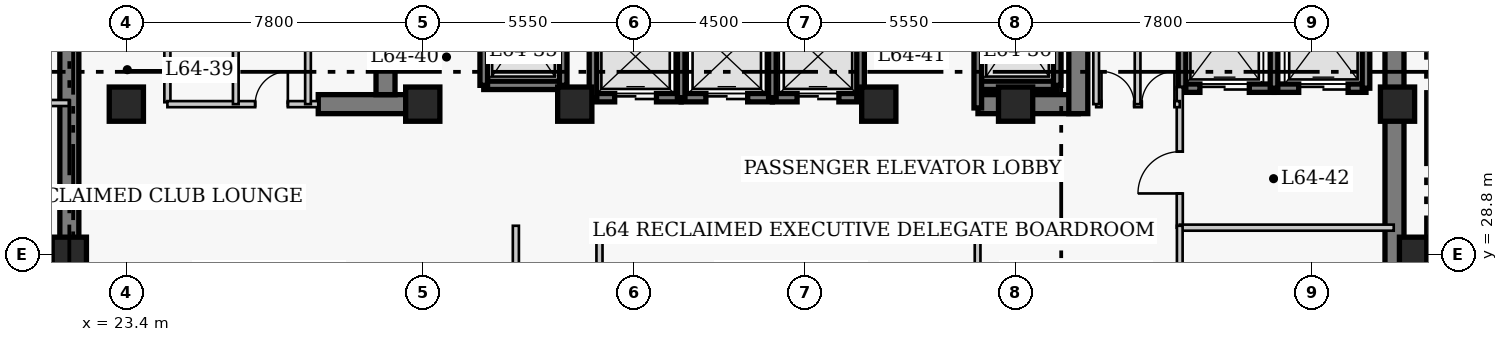
"""IFC4 building model, lengths in metres.
Left out: names, types, materials, properties, quantities, classifications, styles, units other than length and angle.
Written with IfcOpenShell. Run it as: python <this file> out.ifc"""

import sys

from ifc_helpers import new_model, si_unit, direction, frame, frame_2d, origin, origin_2d, place, context, subcontext, project, spatial, rectangle, extrude, element, fill, save


model = new_model("IFC4")
c1 = context("Model", 3, precision=1e-05, world=origin(), true_north=direction((0.0, 1.0)))
c2 = subcontext(c1, "Body", "Model", "MODEL_VIEW")
j1 = project(units=[si_unit("LENGTHUNIT", "METRE"), si_unit("PLANEANGLEUNIT", "RADIAN")], contexts=[c1])
p1 = place(None, origin())
s1 = spatial("IfcSite", under=j1, at=p1, CompositionType="ELEMENT")
p2 = place(p1, origin())
s2 = spatial("IfcBuilding", under=s1, at=p2, CompositionType="ELEMENT")
p3 = place(p2, frame((0.0, 0.0, 257.4)))
s3 = spatial("IfcBuildingStorey", under=s2, at=p3, CompositionType="ELEMENT", Elevation=257.4)
for number, where, z_axis, x_axis in (
    (1, (21.9, 27.05, 0.0), (0.0, 0.0, 1.0), (0.0, 1.0, 0.0)),
    (2, (56.77, 27.05, 0.0), (0.0, 0.0, 1.0), (0.0, 1.0, 0.0)),
):
    element("IfcWall", number, at=place(p3, frame(where, z_axis=z_axis, x_axis=x_axis)), inside=s3, PredefinedType="SHEAR", context=c2, shape_type="SweptSolid", body=[
        extrude(rectangle(XDim=13.52, YDim=0.5, at=frame_2d((6.76, 0.0))), origin(), (0.0, 0.0, 1.0), 4.0),
    ])
p4 = place(p3, frame((28.45, 32.75, 0.0), z_axis=(0.0, 0.0, 1.0), x_axis=(1.0, 0.0, 0.0)))
e3 = element("IfcWall", 3, at=p4, inside=s3, PredefinedType="SHEAR", context=c2, shape_type="SweptSolid", body=[
    extrude(rectangle(XDim=2.4, YDim=0.5, at=frame_2d((1.2, 0.0))), origin(), (0.0, 0.0, 1.0), 4.0),
])
p5 = place(p3, frame((45.81, 32.75, 0.0), z_axis=(0.0, 0.0, 1.0), x_axis=(1.0, 0.0, 0.0)))
e4 = element("IfcWall", 4, at=p5, inside=s3, PredefinedType="SHEAR", context=c2, shape_type="SweptSolid", body=[
    extrude(rectangle(XDim=2.64, YDim=0.5, at=frame_2d((1.32, 0.0))), origin(), (0.0, 0.0, 1.0), 4.0),
])
p6 = place(p3, frame((30.22, 33.0, 0.0), z_axis=(0.0, 0.0, 1.0), x_axis=(0.0, 1.0, 0.0)))
e5 = element("IfcWall", 5, at=p6, inside=s3, PredefinedType="SHEAR", context=c2, shape_type="SweptSolid", body=[
    extrude(rectangle(XDim=7.32, YDim=0.5, at=frame_2d((3.66, 0.0))), origin(), (0.0, 0.0, 1.0), 4.0),
])
p7 = place(p3, frame((48.45, 32.5, 0.0), z_axis=(0.0, 0.0, 1.0), x_axis=(0.0, 1.0, 0.0)))
e6 = element("IfcWall", 6, at=p7, inside=s3, PredefinedType="SHEAR", context=c2, shape_type="SweptSolid", body=[
    extrude(rectangle(XDim=7.82, YDim=0.5, at=frame_2d((3.91, 0.0))), origin(), (0.0, 0.0, 1.0), 4.0),
])
p8 = place(p7, frame((5.7, 0.0, 0.0)))
e7 = element("IfcOpeningElement", 7, at=p8, cuts=e6, PredefinedType="OPENING", context=c2, shape_type="SweptSolid", body=[
    extrude(rectangle(XDim=1.1, YDim=2.15, at=frame_2d((0.55, 1.075))), frame((0.0, 0.26, 0.0), z_axis=(0.0, -1.0, 0.0), x_axis=(1.0, 0.0, 0.0)), (0.0, 0.0, 1.0), 0.52),
])
for number, where, z_axis, x_axis in (
    (8, (21.9, 28.8, 0.0), (0.0, 0.0, 1.0), (1.0, 0.0, 0.0)),
    (9, (57.35, 28.8, 0.0), (0.0, 0.0, 1.0), (1.0, 0.0, 0.0)),
    (10, (23.4, 32.75, 0.0), (0.0, 0.0, 1.0), (1.0, 0.0, 0.0)),
    (11, (31.2, 32.75, 0.0), (0.0, 0.0, 1.0), (1.0, 0.0, 0.0)),
    (12, (35.2, 32.75, 0.0), (0.0, 0.0, 1.0), (1.0, 0.0, 0.0)),
    (13, (43.2, 32.75, 0.0), (0.0, 0.0, 1.0), (1.0, 0.0, 0.0)),
    (14, (46.8, 32.75, 0.0), (0.0, 0.0, 1.0), (1.0, 0.0, 0.0)),
    (15, (56.85, 32.75, 0.0), (0.0, 0.0, 1.0), (1.0, 0.0, 0.0)),
):
    element("IfcColumn", number, at=place(p3, frame(where, z_axis=z_axis, x_axis=x_axis)), inside=s3, PredefinedType="COLUMN", context=c2, shape_type="SweptSolid", body=[
        extrude(rectangle(XDim=0.9, YDim=0.9, at=origin_2d()), origin(), (0.0, 0.0, 1.0), 4.0),
    ])
p9 = place(p3, frame((35.68, 32.92, 0.0), z_axis=(0.0, 0.0, 1.0), x_axis=(1.0, 0.0, 0.0)))
e16 = element("IfcWall", 16, at=p9, inside=s3, PredefinedType="SHEAR", context=c2, shape_type="SweptSolid", body=[
    extrude(rectangle(XDim=2.32, YDim=0.22, at=frame_2d((1.16, 0.0))), origin(), (0.0, 0.0, 1.0), 4.0),
])
p10 = place(p9, frame((0.57, 0.0, 0.0)))
e17 = element("IfcOpeningElement", 17, at=p10, cuts=e16, PredefinedType="OPENING", context=c2, shape_type="SweptSolid", body=[
    extrude(rectangle(XDim=1.1, YDim=2.15, at=frame_2d((0.55, 1.075))), frame((0.0, 0.12, 0.0), z_axis=(0.0, -1.0, 0.0), x_axis=(1.0, 0.0, 0.0)), (0.0, 0.0, 1.0), 0.24),
])
p11 = place(p3, frame((35.68, 32.92, 0.0), z_axis=(0.0, 0.0, 1.0), x_axis=(0.0, 1.0, 0.0)))
e18 = element("IfcWall", 18, at=p11, inside=s3, PredefinedType="SHEAR", context=c2, shape_type="SweptSolid", body=[
    extrude(rectangle(XDim=2.16, YDim=0.2, at=frame_2d((1.08, 0.0))), origin(), (0.0, 0.0, 1.0), 4.0),
])
p12 = place(p3, frame((38.0, 32.92, 0.0), z_axis=(0.0, 0.0, 1.0), x_axis=(1.0, 0.0, 0.0)))
e19 = element("IfcWall", 19, at=p12, inside=s3, PredefinedType="SHEAR", context=c2, shape_type="SweptSolid", body=[
    extrude(rectangle(XDim=2.4, YDim=0.22, at=frame_2d((1.2, 0.0))), origin(), (0.0, 0.0, 1.0), 4.0),
])
p13 = place(p12, frame((0.65, 0.0, 0.0)))
e20 = element("IfcOpeningElement", 20, at=p13, cuts=e19, PredefinedType="OPENING", context=c2, shape_type="SweptSolid", body=[
    extrude(rectangle(XDim=1.1, YDim=2.15, at=frame_2d((0.55, 1.075))), frame((0.0, 0.12, 0.0), z_axis=(0.0, -1.0, 0.0), x_axis=(1.0, 0.0, 0.0)), (0.0, 0.0, 1.0), 0.24),
])
p14 = place(p3, frame((38.0, 32.92, 0.0), z_axis=(0.0, 0.0, 1.0), x_axis=(0.0, 1.0, 0.0)))
e21 = element("IfcWall", 21, at=p14, inside=s3, PredefinedType="SHEAR", context=c2, shape_type="SweptSolid", body=[
    extrude(rectangle(XDim=2.16, YDim=0.2, at=frame_2d((1.08, 0.0))), origin(), (0.0, 0.0, 1.0), 4.0),
])
p15 = place(p3, frame((40.4, 32.92, 0.0), z_axis=(0.0, 0.0, 1.0), x_axis=(1.0, 0.0, 0.0)))
e22 = element("IfcWall", 22, at=p15, inside=s3, PredefinedType="SHEAR", context=c2, shape_type="SweptSolid", body=[
    extrude(rectangle(XDim=2.32, YDim=0.22, at=frame_2d((1.16, 0.0))), origin(), (0.0, 0.0, 1.0), 4.0),
])
p16 = place(p15, frame((0.65, 0.0, 0.0)))
e23 = element("IfcOpeningElement", 23, at=p16, cuts=e22, PredefinedType="OPENING", context=c2, shape_type="SweptSolid", body=[
    extrude(rectangle(XDim=1.1, YDim=2.15, at=frame_2d((0.55, 1.075))), frame((0.0, 0.12, 0.0), z_axis=(0.0, -1.0, 0.0), x_axis=(1.0, 0.0, 0.0)), (0.0, 0.0, 1.0), 0.24),
])
for number, where, z_axis, x_axis in (
    (24, (40.4, 32.92, 0.0), (0.0, 0.0, 1.0), (0.0, 1.0, 0.0)),
    (25, (42.72, 32.92, 0.0), (0.0, 0.0, 1.0), (0.0, 1.0, 0.0)),
):
    element("IfcWall", number, at=place(p3, frame(where, z_axis=z_axis, x_axis=x_axis)), inside=s3, PredefinedType="SHEAR", context=c2, shape_type="SweptSolid", body=[
        extrude(rectangle(XDim=2.16, YDim=0.2, at=frame_2d((1.08, 0.0))), origin(), (0.0, 0.0, 1.0), 4.0),
    ])
p17 = place(p3, frame((51.18, 33.17, 0.0), z_axis=(0.0, 0.0, 1.0), x_axis=(1.0, 0.0, 0.0)))
e26 = element("IfcWall", 26, at=p17, inside=s3, PredefinedType="SHEAR", context=c2, shape_type="SweptSolid", body=[
    extrude(rectangle(XDim=2.42, YDim=0.22, at=frame_2d((1.21, 0.0))), origin(), (0.0, 0.0, 1.0), 4.0),
])
p18 = place(p17, frame((0.47, 0.0, 0.0)))
e27 = element("IfcOpeningElement", 27, at=p18, cuts=e26, PredefinedType="OPENING", context=c2, shape_type="SweptSolid", body=[
    extrude(rectangle(XDim=1.3, YDim=2.15, at=frame_2d((0.65, 1.075))), frame((0.0, 0.12, 0.0), z_axis=(0.0, -1.0, 0.0), x_axis=(1.0, 0.0, 0.0)), (0.0, 0.0, 1.0), 0.24),
])
p19 = place(p3, frame((51.18, 33.17, 0.0), z_axis=(0.0, 0.0, 1.0), x_axis=(0.0, 1.0, 0.0)))
e28 = element("IfcWall", 28, at=p19, inside=s3, PredefinedType="SHEAR", context=c2, shape_type="SweptSolid", body=[
    extrude(rectangle(XDim=2.86, YDim=0.2, at=frame_2d((1.43, 0.0))), origin(), (0.0, 0.0, 1.0), 4.0),
])
p20 = place(p3, frame((53.6, 33.17, 0.0), z_axis=(0.0, 0.0, 1.0), x_axis=(1.0, 0.0, 0.0)))
e29 = element("IfcWall", 29, at=p20, inside=s3, PredefinedType="SHEAR", context=c2, shape_type="SweptSolid", body=[
    extrude(rectangle(XDim=2.42, YDim=0.22, at=frame_2d((1.21, 0.0))), origin(), (0.0, 0.0, 1.0), 4.0),
])
p21 = place(p20, frame((0.65, 0.0, 0.0)))
e30 = element("IfcOpeningElement", 30, at=p21, cuts=e29, PredefinedType="OPENING", context=c2, shape_type="SweptSolid", body=[
    extrude(rectangle(XDim=1.3, YDim=2.15, at=frame_2d((0.65, 1.075))), frame((0.0, 0.12, 0.0), z_axis=(0.0, -1.0, 0.0), x_axis=(1.0, 0.0, 0.0)), (0.0, 0.0, 1.0), 0.24),
])
for number, where, z_axis, x_axis in (
    (31, (53.6, 33.17, 0.0), (0.0, 0.0, 1.0), (0.0, 1.0, 0.0)),
    (32, (56.02, 33.17, 0.0), (0.0, 0.0, 1.0), (0.0, 1.0, 0.0)),
):
    element("IfcWall", number, at=place(p3, frame(where, z_axis=z_axis, x_axis=x_axis)), inside=s3, PredefinedType="SHEAR", context=c2, shape_type="SweptSolid", body=[
        extrude(rectangle(XDim=2.86, YDim=0.2, at=frame_2d((1.43, 0.0))), origin(), (0.0, 0.0, 1.0), 4.0),
    ])
p22 = place(p3, frame((32.805, 33.245, 0.0), z_axis=(0.0, 0.0, 1.0), x_axis=(1.0, 0.0, 0.0)))
e33 = element("IfcWall", 33, at=p22, inside=s3, PredefinedType="SHEAR", context=c2, shape_type="SweptSolid", body=[
    extrude(rectangle(XDim=2.09, YDim=0.22, at=frame_2d((1.045, 0.0))), origin(), (0.0, 0.0, 1.0), 4.0),
])
for number, where, z_axis, x_axis in (
    (34, (32.805, 33.245, 0.0), (0.0, 0.0, 1.0), (0.0, 1.0, 0.0)),
    (35, (34.895, 33.245, 0.0), (0.0, 0.0, 1.0), (0.0, 1.0, 0.0)),
):
    element("IfcWall", number, at=place(p3, frame(where, z_axis=z_axis, x_axis=x_axis)), inside=s3, PredefinedType="SHEAR", context=c2, shape_type="SweptSolid", body=[
        extrude(rectangle(XDim=2.91, YDim=0.2, at=frame_2d((1.455, 0.0))), origin(), (0.0, 0.0, 1.0), 4.0),
    ])
p23 = place(p3, frame((45.805, 33.245, 0.0), z_axis=(0.0, 0.0, 1.0), x_axis=(1.0, 0.0, 0.0)))
e36 = element("IfcWall", 36, at=p23, inside=s3, PredefinedType="SHEAR", context=c2, shape_type="SweptSolid", body=[
    extrude(rectangle(XDim=2.09, YDim=0.22, at=frame_2d((1.045, 0.0))), origin(), (0.0, 0.0, 1.0), 4.0),
])
p24 = place(p3, frame((45.805, 32.65, 0.0), z_axis=(0.0, 0.0, 1.0), x_axis=(0.0, 1.0, 0.0)))
e37 = element("IfcWall", 37, at=p24, inside=s3, PredefinedType="SHEAR", context=c2, shape_type="SweptSolid", body=[
    extrude(rectangle(XDim=3.505, YDim=0.2, at=frame_2d((1.752, 0.0))), origin(), (0.0, 0.0, 1.0), 4.0),
])
p25 = place(p3, frame((47.895, 33.245, 0.0), z_axis=(0.0, 0.0, 1.0), x_axis=(0.0, 1.0, 0.0)))
e38 = element("IfcWall", 38, at=p25, inside=s3, PredefinedType="SHEAR", context=c2, shape_type="SweptSolid", body=[
    extrude(rectangle(XDim=2.91, YDim=0.2, at=frame_2d((1.455, 0.0))), origin(), (0.0, 0.0, 1.0), 4.0),
])
p26 = place(p3, frame((24.48, 32.8, 0.0), z_axis=(0.0, 0.0, 1.0), x_axis=(0.0, 1.0, 0.0)))
e39 = element("IfcWall", 39, at=p26, inside=s3, PredefinedType="PARTITIONING", context=c2, shape_type="SweptSolid", body=[
    extrude(rectangle(XDim=3.57, YDim=0.16, at=frame_2d((1.785, 0.0))), origin(), (0.0, 0.0, 1.0), 3.76),
])
p27 = place(p26, frame((1.604, 0.0, 0.0)))
e40 = element("IfcOpeningElement", 40, at=p27, cuts=e39, PredefinedType="OPENING", context=c2, shape_type="SweptSolid", body=[
    extrude(rectangle(XDim=0.9, YDim=2.1, at=frame_2d((0.45, 1.05))), frame((0.0, 0.09, 0.0), z_axis=(0.0, -1.0, 0.0), x_axis=(1.0, 0.0, 0.0)), (0.0, 0.0, 1.0), 0.18),
])
p28 = place(p3, frame((51.12, 29.5, 0.0), z_axis=(0.0, 0.0, 1.0), x_axis=(0.0, 1.0, 0.0)))
e41 = element("IfcWall", 41, at=p28, inside=s3, PredefinedType="PARTITIONING", context=c2, shape_type="SweptSolid", body=[
    extrude(rectangle(XDim=3.7, YDim=0.16, at=frame_2d((1.85, 0.0))), origin(), (0.0, 0.0, 1.0), 3.76),
])
p29 = place(p28, frame((0.9, 0.0, 0.0)))
e42 = element("IfcOpeningElement", 42, at=p29, cuts=e41, PredefinedType="OPENING", context=c2, shape_type="SweptSolid", body=[
    extrude(rectangle(XDim=1.1, YDim=2.15, at=frame_2d((0.55, 1.075))), frame((0.0, 0.09, 0.0), z_axis=(0.0, -1.0, 0.0), x_axis=(1.0, 0.0, 0.0)), (0.0, 0.0, 1.0), 0.18),
])
p30 = place(p3, frame((51.12, 29.5, 0.0), z_axis=(0.0, 0.0, 1.0), x_axis=(1.0, 0.0, 0.0)))
e43 = element("IfcWall", 43, at=p30, inside=s3, PredefinedType="PARTITIONING", context=c2, shape_type="SweptSolid", body=[
    extrude(rectangle(XDim=5.63, YDim=0.16, at=frame_2d((2.815, 0.0))), origin(), (0.0, 0.0, 1.0), 3.76),
])
p31 = place(p3, frame((24.48, 32.75, 0.0), z_axis=(0.0, 0.0, 1.0), x_axis=(1.0, 0.0, 0.0)))
e44 = element("IfcWall", 44, at=p31, inside=s3, PredefinedType="PARTITIONING", context=c2, shape_type="SweptSolid", body=[
    extrude(rectangle(XDim=3.97, YDim=0.16, at=frame_2d((1.985, 0.0))), origin(), (0.0, 0.0, 1.0), 3.76),
])
p32 = place(p31, frame((2.31, 0.0, 0.0)))
e45 = element("IfcOpeningElement", 45, at=p32, cuts=e44, PredefinedType="OPENING", context=c2, shape_type="SweptSolid", body=[
    extrude(rectangle(XDim=0.86, YDim=2.05, at=frame_2d((0.43, 1.025))), frame((0.0, 0.09, 0.0), z_axis=(0.0, -1.0, 0.0), x_axis=(1.0, 0.0, 0.0)), (0.0, 0.0, 1.0), 0.18),
])
p33 = place(p3, frame((48.92, 32.75, 0.0), z_axis=(0.0, 0.0, 1.0), x_axis=(1.0, 0.0, 0.0)))
e46 = element("IfcWall", 46, at=p33, inside=s3, PredefinedType="PARTITIONING", context=c2, shape_type="SweptSolid", body=[
    extrude(rectangle(XDim=2.2, YDim=0.16, at=frame_2d((1.1, 0.0))), origin(), (0.0, 0.0, 1.0), 3.76),
])
p34 = place(p33, frame((0.14, 0.0, 0.0)))
e47 = element("IfcOpeningElement", 47, at=p34, cuts=e46, PredefinedType="OPENING", context=c2, shape_type="SweptSolid", body=[
    extrude(rectangle(XDim=0.86, YDim=2.05, at=frame_2d((0.43, 1.025))), frame((0.0, 0.09, 0.0), z_axis=(0.0, -1.0, 0.0), x_axis=(1.0, 0.0, 0.0)), (0.0, 0.0, 1.0), 0.18),
])
p35 = place(p33, frame((1.2, 0.0, 0.0)))
e48 = element("IfcOpeningElement", 48, at=p35, cuts=e46, PredefinedType="OPENING", context=c2, shape_type="SweptSolid", body=[
    extrude(rectangle(XDim=0.86, YDim=2.05, at=frame_2d((0.43, 1.025))), frame((0.0, 0.09, 0.0), z_axis=(0.0, -1.0, 0.0), x_axis=(1.0, 0.0, 0.0)), (0.0, 0.0, 1.0), 0.18),
])
for number, where, z_axis, x_axis in (
    (49, (48.92, 32.75, 0.0), (0.0, 0.0, 1.0), (0.0, 1.0, 0.0)),
    (50, (26.28, 32.75, 0.0), (0.0, 0.0, 1.0), (0.0, 1.0, 0.0)),
    (51, (28.18, 32.75, 0.0), (0.0, 0.0, 1.0), (0.0, 1.0, 0.0)),
    (52, (50.01, 32.75, 0.0), (0.0, 0.0, 1.0), (0.0, 1.0, 0.0)),
):
    element("IfcWall", number, at=place(p3, frame(where, z_axis=z_axis, x_axis=x_axis)), inside=s3, PredefinedType="PARTITIONING", context=c2, shape_type="SweptSolid", body=[
        extrude(rectangle(XDim=3.62, YDim=0.15, at=frame_2d((1.81, 0.0))), origin(), (0.0, 0.0, 1.0), 3.76),
    ])
for number, where, z_axis, x_axis in (
    (53, (33.65, 26.41, 0.0), (0.0, 0.0, 1.0), (0.0, 1.0, 0.0)),
    (54, (35.85, 26.41, 0.0), (0.0, 0.0, 1.0), (0.0, 1.0, 0.0)),
):
    element("IfcWall", number, at=place(p3, frame(where, z_axis=z_axis, x_axis=x_axis)), inside=s3, PredefinedType="PARTITIONING", context=c2, shape_type="SweptSolid", body=[
        extrude(rectangle(XDim=3.14, YDim=0.16, at=frame_2d((1.57, 0.0))), origin(), (0.0, 0.0, 1.0), 3.76),
    ])
p36 = place(p3, frame((20.46, 32.78, 0.0), z_axis=(0.0, 0.0, 1.0), x_axis=(1.0, 0.0, 0.0)))
e55 = element("IfcWall", 55, at=p36, inside=s3, PredefinedType="PARTITIONING", context=c2, shape_type="SweptSolid", body=[
    extrude(rectangle(XDim=1.44, YDim=0.16, at=frame_2d((0.72, 0.0))), origin(), (0.0, 0.0, 1.0), 3.76),
])
for number, where, z_axis, x_axis in (
    (56, (45.8, 26.41, 0.0), (0.0, 0.0, 1.0), (0.0, 1.0, 0.0)),
    (57, (51.12, 26.41, 0.0), (0.0, 0.0, 1.0), (0.0, 1.0, 0.0)),
):
    element("IfcWall", number, at=place(p3, frame(where, z_axis=z_axis, x_axis=x_axis)), inside=s3, PredefinedType="PARTITIONING", context=c2, shape_type="SweptSolid", body=[
        extrude(rectangle(XDim=3.14, YDim=0.15, at=frame_2d((1.57, 0.0))), origin(), (0.0, 0.0, 1.0), 3.76),
    ])
p37 = place(p10, origin())
e58 = element("IfcDoor", 58, at=p37, inside=s3, OperationType="DOUBLE_DOOR_SLIDING", PredefinedType="DOOR", context=c2, shape_type="SweptSolid", body=[
    extrude(rectangle(XDim=1.1, YDim=2.15, at=frame_2d((0.55, 1.075))), frame((0.0, 0.025, 0.0), z_axis=(0.0, -1.0, 0.0), x_axis=(1.0, 0.0, 0.0)), (0.0, 0.0, 1.0), 0.05),
])
fill(e17, e58)
p38 = place(p13, origin())
e59 = element("IfcDoor", 59, at=p38, inside=s3, OperationType="DOUBLE_DOOR_SLIDING", PredefinedType="DOOR", context=c2, shape_type="SweptSolid", body=[
    extrude(rectangle(XDim=1.1, YDim=2.15, at=frame_2d((0.55, 1.075))), frame((0.0, 0.025, 0.0), z_axis=(0.0, -1.0, 0.0), x_axis=(1.0, 0.0, 0.0)), (0.0, 0.0, 1.0), 0.05),
])
fill(e20, e59)
p39 = place(p16, origin())
e60 = element("IfcDoor", 60, at=p39, inside=s3, OperationType="DOUBLE_DOOR_SLIDING", PredefinedType="DOOR", context=c2, shape_type="SweptSolid", body=[
    extrude(rectangle(XDim=1.1, YDim=2.15, at=frame_2d((0.55, 1.075))), frame((0.0, 0.025, 0.0), z_axis=(0.0, -1.0, 0.0), x_axis=(1.0, 0.0, 0.0)), (0.0, 0.0, 1.0), 0.05),
])
fill(e23, e60)
p40 = place(p18, origin())
e61 = element("IfcDoor", 61, at=p40, inside=s3, OperationType="DOUBLE_DOOR_SLIDING", PredefinedType="DOOR", context=c2, shape_type="SweptSolid", body=[
    extrude(rectangle(XDim=1.3, YDim=2.15, at=frame_2d((0.65, 1.075))), frame((0.0, 0.025, 0.0), z_axis=(0.0, -1.0, 0.0), x_axis=(1.0, 0.0, 0.0)), (0.0, 0.0, 1.0), 0.05),
])
fill(e27, e61)
p41 = place(p21, origin())
e62 = element("IfcDoor", 62, at=p41, inside=s3, OperationType="DOUBLE_DOOR_SLIDING", PredefinedType="DOOR", context=c2, shape_type="SweptSolid", body=[
    extrude(rectangle(XDim=1.3, YDim=2.15, at=frame_2d((0.65, 1.075))), frame((0.0, 0.025, 0.0), z_axis=(0.0, -1.0, 0.0), x_axis=(1.0, 0.0, 0.0)), (0.0, 0.0, 1.0), 0.05),
])
fill(e30, e62)
p42 = place(p29, origin())
e63 = element("IfcDoor", 63, at=p42, inside=s3, OperationType="SINGLE_SWING_LEFT", PredefinedType="DOOR", context=c2, shape_type="SweptSolid", body=[
    extrude(rectangle(XDim=1.1, YDim=2.15, at=frame_2d((0.55, 1.075))), frame((0.0, 0.025, 0.0), z_axis=(0.0, -1.0, 0.0), x_axis=(1.0, 0.0, 0.0)), (0.0, 0.0, 1.0), 0.05),
])
fill(e42, e63)
p43 = place(p32, origin())
e64 = element("IfcDoor", 64, at=p43, inside=s3, OperationType="SINGLE_SWING_RIGHT", PredefinedType="DOOR", context=c2, shape_type="SweptSolid", body=[
    extrude(rectangle(XDim=0.86, YDim=2.05, at=frame_2d((0.43, 1.025))), frame((0.0, 0.025, 0.0), z_axis=(0.0, -1.0, 0.0), x_axis=(1.0, 0.0, 0.0)), (0.0, 0.0, 1.0), 0.05),
])
fill(e45, e64)
p44 = place(p34, origin())
e65 = element("IfcDoor", 65, at=p44, inside=s3, OperationType="SINGLE_SWING_LEFT", PredefinedType="DOOR", context=c2, shape_type="SweptSolid", body=[
    extrude(rectangle(XDim=0.86, YDim=2.05, at=frame_2d((0.43, 1.025))), frame((0.0, 0.025, 0.0), z_axis=(0.0, -1.0, 0.0), x_axis=(1.0, 0.0, 0.0)), (0.0, 0.0, 1.0), 0.05),
])
fill(e47, e65)
p45 = place(p35, origin())
e66 = element("IfcDoor", 66, at=p45, inside=s3, OperationType="SINGLE_SWING_RIGHT", PredefinedType="DOOR", context=c2, shape_type="SweptSolid", body=[
    extrude(rectangle(XDim=0.86, YDim=2.05, at=frame_2d((0.43, 1.025))), frame((0.0, 0.025, 0.0), z_axis=(0.0, -1.0, 0.0), x_axis=(1.0, 0.0, 0.0)), (0.0, 0.0, 1.0), 0.05),
])
fill(e48, e66)
save(model, sys.argv[1])
